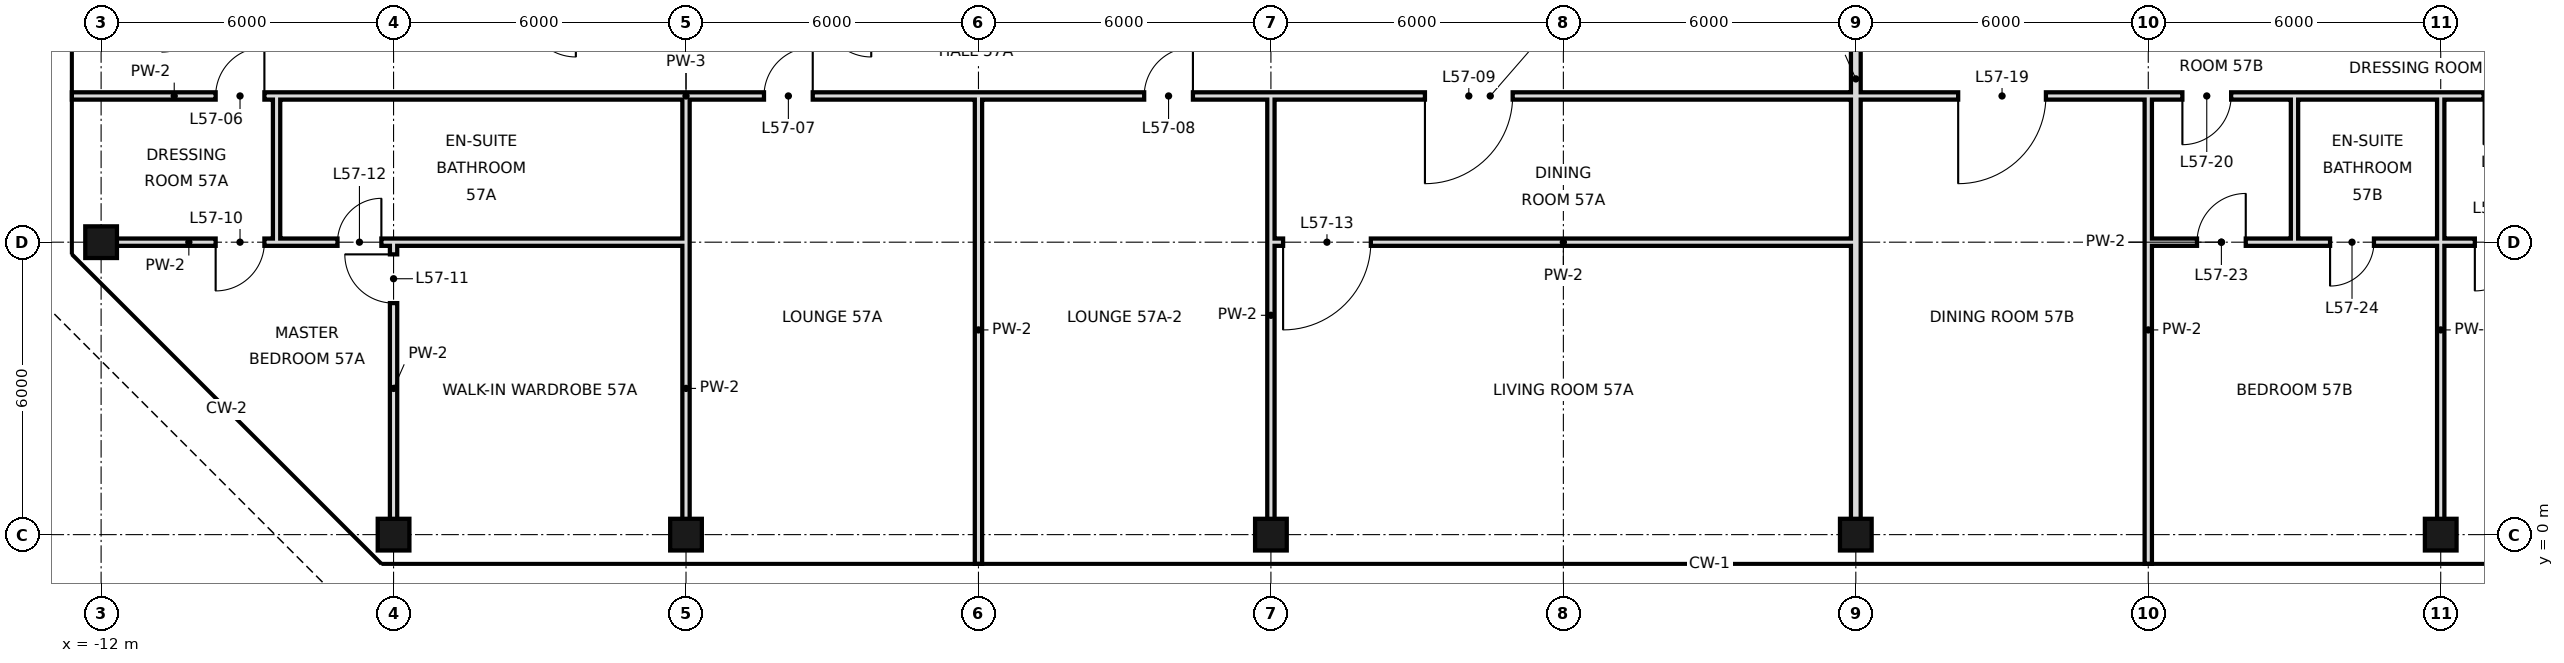
"""IFC4 building model, lengths in metres.
Left out: names, types, materials, properties, quantities, classifications, styles, units other than length and angle.
Written with IfcOpenShell. Run it as: python <this file> out.ifc"""

import sys

from ifc_helpers import new_model, si_unit, direction, frame, frame_2d, origin, origin_2d, place, context, subcontext, project, spatial, rectangle, hollow_rectangle, extrude, element, fill, save


model = new_model("IFC4")
c1 = context("Model", 3, precision=1e-05, world=origin(), true_north=direction((0.0, 1.0)))
c2 = subcontext(c1, "Body", "Model", "MODEL_VIEW")
j1 = project(units=[si_unit("LENGTHUNIT", "METRE"), si_unit("PLANEANGLEUNIT", "RADIAN")], contexts=[c1])
p1 = place(None, origin())
s1 = spatial("IfcSite", under=j1, at=p1, CompositionType="ELEMENT")
p2 = place(p1, origin())
s2 = spatial("IfcBuilding", under=s1, at=p2, CompositionType="ELEMENT")
p3 = place(p2, frame((0.0, 0.0, 243.2)))
s3 = spatial("IfcBuildingStorey", under=s2, at=p3, CompositionType="ELEMENT", Elevation=243.2)
for number, where, z_axis, x_axis in (
    (1, (-12.0, 6.0, 0.0), (0.0, 0.0, 1.0), (1.0, 0.0, 0.0)),
    (2, (-6.0, 0.0, 0.0), (0.0, 0.0, 1.0), (1.0, 0.0, 0.0)),
    (3, (0.0, 0.0, 0.0), (0.0, 0.0, 1.0), (1.0, 0.0, 0.0)),
    (4, (12.0, 0.0, 0.0), (0.0, 0.0, 1.0), (1.0, 0.0, 0.0)),
    (5, (24.0, 0.0, 0.0), (0.0, 0.0, 1.0), (1.0, 0.0, 0.0)),
    (6, (36.0, 0.0, 0.0), (0.0, 0.0, 1.0), (1.0, 0.0, 0.0)),
):
    element("IfcColumn", number, at=place(p3, frame(where, z_axis=z_axis, x_axis=x_axis)), inside=s3, PredefinedType="COLUMN", context=c2, shape_type="SweptSolid", body=[
        extrude(hollow_rectangle(XDim=0.65, YDim=0.65, WallThickness=0.032, at=origin_2d()), origin(), (0.0, 0.0, 1.0), 3.6),
    ])
p4 = place(p3, frame((-6.0, 0.0, 0.0), z_axis=(0.0, 0.0, 1.0), x_axis=(0.0, 1.0, 0.0)))
e7 = element("IfcWall", 7, at=p4, inside=s3, PredefinedType="PARTITIONING", context=c2, shape_type="SweptSolid", body=[
    extrude(rectangle(XDim=6.0, YDim=0.15, at=frame_2d((3.0, 0.0))), origin(), (0.0, 0.0, 1.0), 3.42),
])
p5 = place(p4, frame((4.75, 0.0, 0.0)))
e8 = element("IfcOpeningElement", 8, at=p5, cuts=e7, PredefinedType="OPENING", context=c2, shape_type="SweptSolid", body=[
    extrude(rectangle(XDim=1.0, YDim=2.4, at=frame_2d((0.5, 1.2))), frame((0.0, 0.085, 0.0), z_axis=(0.0, -1.0, 0.0), x_axis=(1.0, 0.0, 0.0)), (0.0, 0.0, 1.0), 0.17),
])
p6 = place(p3, frame((-8.4, 6.0, 0.0), z_axis=(0.0, 0.0, 1.0), x_axis=(0.0, 1.0, 0.0)))
e9 = element("IfcWall", 9, at=p6, inside=s3, PredefinedType="PARTITIONING", context=c2, shape_type="SweptSolid", body=[
    extrude(rectangle(XDim=3.0, YDim=0.15, at=frame_2d((1.5, 0.0))), origin(), (0.0, 0.0, 1.0), 3.42),
])
p7 = place(p3, frame((0.0, 0.0, 0.0), z_axis=(0.0, 0.0, 1.0), x_axis=(0.0, 1.0, 0.0)))
e10 = element("IfcWall", 10, at=p7, inside=s3, PredefinedType="PARTITIONING", context=c2, shape_type="SweptSolid", body=[
    extrude(rectangle(XDim=6.0, YDim=0.15, at=frame_2d((3.0, 0.0))), origin(), (0.0, 0.0, 1.0), 2.72),
])
p8 = place(p3, frame((0.0, 6.0, 0.0), z_axis=(0.0, 0.0, 1.0), x_axis=(0.0, 1.0, 0.0)))
e11 = element("IfcWall", 11, at=p8, inside=s3, PredefinedType="PARTITIONING", context=c2, shape_type="SweptSolid", body=[
    extrude(rectangle(XDim=3.0, YDim=0.15, at=frame_2d((1.5, 0.0))), origin(), (0.0, 0.0, 1.0), 2.72),
])
p9 = place(p3, frame((12.0, 0.0, 0.0), z_axis=(0.0, 0.0, 1.0), x_axis=(0.0, 1.0, 0.0)))
e12 = element("IfcWall", 12, at=p9, inside=s3, PredefinedType="PARTITIONING", context=c2, shape_type="SweptSolid", body=[
    extrude(rectangle(XDim=9.0, YDim=0.15, at=frame_2d((4.5, 0.0))), origin(), (0.0, 0.0, 1.0), 2.72),
])
p10 = place(p3, frame((24.0, 0.0, 0.0), z_axis=(0.0, 0.0, 1.0), x_axis=(0.0, 1.0, 0.0)))
e13 = element("IfcWall", 13, at=p10, inside=s3, PredefinedType="SOLIDWALL", context=c2, shape_type="SweptSolid", body=[
    extrude(rectangle(XDim=18.7, YDim=0.2, at=frame_2d((9.35, 0.0))), origin(), (0.0, 0.0, 1.0), 2.72),
])
p11 = place(p3, frame((30.0, -0.6, 0.0), z_axis=(0.0, 0.0, 1.0), x_axis=(0.0, 1.0, 0.0)))
e14 = element("IfcWall", 14, at=p11, inside=s3, PredefinedType="PARTITIONING", context=c2, shape_type="SweptSolid", body=[
    extrude(rectangle(XDim=9.6, YDim=0.15, at=frame_2d((4.8, 0.0))), origin(), (0.0, 0.0, 1.0), 2.72),
])
p12 = place(p3, frame((33.0, 6.0, 0.0), z_axis=(0.0, 0.0, 1.0), x_axis=(0.0, 1.0, 0.0)))
e15 = element("IfcWall", 15, at=p12, inside=s3, PredefinedType="PARTITIONING", context=c2, shape_type="SweptSolid", body=[
    extrude(rectangle(XDim=3.0, YDim=0.15, at=frame_2d((1.5, 0.0))), origin(), (0.0, 0.0, 1.0), 3.42),
])
p13 = place(p3, frame((36.0, 0.0, 0.0), z_axis=(0.0, 0.0, 1.0), x_axis=(0.0, 1.0, 0.0)))
e16 = element("IfcWall", 16, at=p13, inside=s3, PredefinedType="PARTITIONING", context=c2, shape_type="SweptSolid", body=[
    extrude(rectangle(XDim=6.0, YDim=0.15, at=frame_2d((3.0, 0.0))), origin(), (0.0, 0.0, 1.0), 2.72),
])
p14 = place(p3, frame((36.0, 6.0, 0.0), z_axis=(0.0, 0.0, 1.0), x_axis=(0.0, 1.0, 0.0)))
e17 = element("IfcWall", 17, at=p14, inside=s3, PredefinedType="PARTITIONING", context=c2, shape_type="SweptSolid", body=[
    extrude(rectangle(XDim=3.0, YDim=0.15, at=frame_2d((1.5, 0.0))), origin(), (0.0, 0.0, 1.0), 2.72),
])
p15 = place(p3, frame((6.0, -0.6, 0.0), z_axis=(0.0, 0.0, 1.0), x_axis=(0.0, 1.0, 0.0)))
e18 = element("IfcWall", 18, at=p15, inside=s3, PredefinedType="PARTITIONING", context=c2, shape_type="SweptSolid", body=[
    extrude(rectangle(XDim=9.6, YDim=0.15, at=frame_2d((4.8, 0.0))), origin(), (0.0, 0.0, 1.0), 2.72),
])
p16 = place(p3, frame((-12.0, 6.0, 0.0), z_axis=(0.0, 0.0, 1.0), x_axis=(1.0, 0.0, 0.0)))
e19 = element("IfcWall", 19, at=p16, inside=s3, PredefinedType="PARTITIONING", context=c2, shape_type="SweptSolid", body=[
    extrude(rectangle(XDim=3.6, YDim=0.15, at=frame_2d((1.8, 0.0))), origin(), (0.0, 0.0, 1.0), 2.72),
])
p17 = place(p16, frame((2.35, 0.0, 0.0)))
e20 = element("IfcOpeningElement", 20, at=p17, cuts=e19, PredefinedType="OPENING", context=c2, shape_type="SweptSolid", body=[
    extrude(rectangle(XDim=1.0, YDim=2.4, at=frame_2d((0.5, 1.2))), frame((0.0, 0.085, 0.0), z_axis=(0.0, -1.0, 0.0), x_axis=(1.0, 0.0, 0.0)), (0.0, 0.0, 1.0), 0.17),
])
p18 = place(p3, frame((12.0, 6.0, 0.0), z_axis=(0.0, 0.0, 1.0), x_axis=(1.0, 0.0, 0.0)))
e21 = element("IfcWall", 21, at=p18, inside=s3, PredefinedType="PARTITIONING", context=c2, shape_type="SweptSolid", body=[
    extrude(rectangle(XDim=12.0, YDim=0.15, at=frame_2d((6.0, 0.0))), origin(), (0.0, 0.0, 1.0), 2.97),
])
p19 = place(p18, frame((0.25, 0.0, 0.0)))
e22 = element("IfcOpeningElement", 22, at=p19, cuts=e21, PredefinedType="OPENING", context=c2, shape_type="SweptSolid", body=[
    extrude(rectangle(XDim=1.8, YDim=2.4, at=frame_2d((0.9, 1.2))), frame((0.0, 0.085, 0.0), z_axis=(0.0, -1.0, 0.0), x_axis=(1.0, 0.0, 0.0)), (0.0, 0.0, 1.0), 0.17),
])
p20 = place(p3, frame((30.0, 6.0, 0.0), z_axis=(0.0, 0.0, 1.0), x_axis=(1.0, 0.0, 0.0)))
e23 = element("IfcWall", 23, at=p20, inside=s3, PredefinedType="PARTITIONING", context=c2, shape_type="SweptSolid", body=[
    extrude(rectangle(XDim=3.0, YDim=0.15, at=frame_2d((1.5, 0.0))), origin(), (0.0, 0.0, 1.0), 2.97),
])
p21 = place(p20, frame((1.0, 0.0, 0.0)))
e24 = element("IfcOpeningElement", 24, at=p21, cuts=e23, PredefinedType="OPENING", context=c2, shape_type="SweptSolid", body=[
    extrude(rectangle(XDim=1.0, YDim=2.4, at=frame_2d((0.5, 1.2))), frame((0.0, 0.085, 0.0), z_axis=(0.0, -1.0, 0.0), x_axis=(1.0, 0.0, 0.0)), (0.0, 0.0, 1.0), 0.17),
])
p22 = place(p3, frame((36.0, 6.0, 0.0), z_axis=(0.0, 0.0, 1.0), x_axis=(1.0, 0.0, 0.0)))
e25 = element("IfcWall", 25, at=p22, inside=s3, PredefinedType="PARTITIONING", context=c2, shape_type="SweptSolid", body=[
    extrude(rectangle(XDim=2.4, YDim=0.15, at=frame_2d((1.2, 0.0))), origin(), (0.0, 0.0, 1.0), 2.97),
])
p23 = place(p22, frame((0.7, 0.0, 0.0)))
e26 = element("IfcOpeningElement", 26, at=p23, cuts=e25, PredefinedType="OPENING", context=c2, shape_type="SweptSolid", body=[
    extrude(rectangle(XDim=1.0, YDim=2.4, at=frame_2d((0.5, 1.2))), frame((0.0, 0.085, 0.0), z_axis=(0.0, -1.0, 0.0), x_axis=(1.0, 0.0, 0.0)), (0.0, 0.0, 1.0), 0.17),
])
p24 = place(p3, frame((-8.4, 6.0, 0.0), z_axis=(0.0, 0.0, 1.0), x_axis=(1.0, 0.0, 0.0)))
e27 = element("IfcWall", 27, at=p24, inside=s3, PredefinedType="PARTITIONING", context=c2, shape_type="SweptSolid", body=[
    extrude(rectangle(XDim=8.4, YDim=0.15, at=frame_2d((4.2, 0.0))), origin(), (0.0, 0.0, 1.0), 2.72),
])
p25 = place(p24, frame((1.25, 0.0, 0.0)))
e28 = element("IfcOpeningElement", 28, at=p25, cuts=e27, PredefinedType="OPENING", context=c2, shape_type="SweptSolid", body=[
    extrude(rectangle(XDim=0.9, YDim=2.4, at=frame_2d((0.45, 1.2))), frame((0.0, 0.085, 0.0), z_axis=(0.0, -1.0, 0.0), x_axis=(1.0, 0.0, 0.0)), (0.0, 0.0, 1.0), 0.17),
])
p26 = place(p3, frame((33.0, 6.0, 0.0), z_axis=(0.0, 0.0, 1.0), x_axis=(1.0, 0.0, 0.0)))
e29 = element("IfcWall", 29, at=p26, inside=s3, PredefinedType="PARTITIONING", context=c2, shape_type="SweptSolid", body=[
    extrude(rectangle(XDim=3.0, YDim=0.15, at=frame_2d((1.5, 0.0))), origin(), (0.0, 0.0, 1.0), 2.97),
])
p27 = place(p26, frame((0.73, 0.0, 0.0)))
e30 = element("IfcOpeningElement", 30, at=p27, cuts=e29, PredefinedType="OPENING", context=c2, shape_type="SweptSolid", body=[
    extrude(rectangle(XDim=0.9, YDim=2.4, at=frame_2d((0.45, 1.2))), frame((0.0, 0.085, 0.0), z_axis=(0.0, -1.0, 0.0), x_axis=(1.0, 0.0, 0.0)), (0.0, 0.0, 1.0), 0.17),
])
p28 = place(p3, frame((-12.6, 9.0, 0.0), z_axis=(0.0, 0.0, 1.0), x_axis=(1.0, 0.0, 0.0)))
e31 = element("IfcWall", 31, at=p28, inside=s3, PredefinedType="PARTITIONING", context=c2, shape_type="SweptSolid", body=[
    extrude(rectangle(XDim=4.2, YDim=0.15, at=frame_2d((2.1, 0.0))), origin(), (0.0, 0.0, 1.0), 3.42),
])
p29 = place(p28, frame((2.95, 0.0, 0.0)))
e32 = element("IfcOpeningElement", 32, at=p29, cuts=e31, PredefinedType="OPENING", context=c2, shape_type="SweptSolid", body=[
    extrude(rectangle(XDim=1.0, YDim=2.4, at=frame_2d((0.5, 1.2))), frame((0.0, 0.085, 0.0), z_axis=(0.0, -1.0, 0.0), x_axis=(1.0, 0.0, 0.0)), (0.0, 0.0, 1.0), 0.17),
])
p30 = place(p3, frame((0.0, 9.0, 0.0), z_axis=(0.0, 0.0, 1.0), x_axis=(1.0, 0.0, 0.0)))
e33 = element("IfcWall", 33, at=p30, inside=s3, PredefinedType="PARTITIONING", context=c2, shape_type="SweptSolid", body=[
    extrude(rectangle(XDim=33.0, YDim=0.15, at=frame_2d((16.5, 0.0))), origin(), (0.0, 0.0, 1.0), 3.42),
])
p31 = place(p30, frame((1.6, 0.0, 0.0)))
e34 = element("IfcOpeningElement", 34, at=p31, cuts=e33, PredefinedType="OPENING", context=c2, shape_type="SweptSolid", body=[
    extrude(rectangle(XDim=1.0, YDim=2.4, at=frame_2d((0.5, 1.2))), frame((0.0, 0.085, 0.0), z_axis=(0.0, -1.0, 0.0), x_axis=(1.0, 0.0, 0.0)), (0.0, 0.0, 1.0), 0.17),
])
p32 = place(p30, frame((9.4, 0.0, 0.0)))
e35 = element("IfcOpeningElement", 35, at=p32, cuts=e33, PredefinedType="OPENING", context=c2, shape_type="SweptSolid", body=[
    extrude(rectangle(XDim=1.0, YDim=2.4, at=frame_2d((0.5, 1.2))), frame((0.0, 0.085, 0.0), z_axis=(0.0, -1.0, 0.0), x_axis=(1.0, 0.0, 0.0)), (0.0, 0.0, 1.0), 0.17),
])
p33 = place(p30, frame((15.16, 0.0, 0.0)))
e36 = element("IfcOpeningElement", 36, at=p33, cuts=e33, PredefinedType="OPENING", context=c2, shape_type="SweptSolid", body=[
    extrude(rectangle(XDim=1.8, YDim=2.4, at=frame_2d((0.9, 1.2))), frame((0.0, 0.085, 0.0), z_axis=(0.0, -1.0, 0.0), x_axis=(1.0, 0.0, 0.0)), (0.0, 0.0, 1.0), 0.17),
])
p34 = place(p30, frame((26.1, 0.0, 0.0)))
e37 = element("IfcOpeningElement", 37, at=p34, cuts=e33, PredefinedType="OPENING", context=c2, shape_type="SweptSolid", body=[
    extrude(rectangle(XDim=1.8, YDim=2.4, at=frame_2d((0.9, 1.2))), frame((0.0, 0.085, 0.0), z_axis=(0.0, -1.0, 0.0), x_axis=(1.0, 0.0, 0.0)), (0.0, 0.0, 1.0), 0.17),
])
p35 = place(p30, frame((30.7, 0.0, 0.0)))
e38 = element("IfcOpeningElement", 38, at=p35, cuts=e33, PredefinedType="OPENING", context=c2, shape_type="SweptSolid", body=[
    extrude(rectangle(XDim=1.0, YDim=2.4, at=frame_2d((0.5, 1.2))), frame((0.0, 0.085, 0.0), z_axis=(0.0, -1.0, 0.0), x_axis=(1.0, 0.0, 0.0)), (0.0, 0.0, 1.0), 0.17),
])
p36 = place(p3, frame((36.0, 9.0, 0.0), z_axis=(0.0, 0.0, 1.0), x_axis=(1.0, 0.0, 0.0)))
e39 = element("IfcWall", 39, at=p36, inside=s3, PredefinedType="PARTITIONING", context=c2, shape_type="SweptSolid", body=[
    extrude(rectangle(XDim=2.4, YDim=0.15, at=frame_2d((1.2, 0.0))), origin(), (0.0, 0.0, 1.0), 3.42),
])
p37 = place(p36, frame((0.88, 0.0, 0.0)))
e40 = element("IfcOpeningElement", 40, at=p37, cuts=e39, PredefinedType="OPENING", context=c2, shape_type="SweptSolid", body=[
    extrude(rectangle(XDim=1.0, YDim=2.4, at=frame_2d((0.5, 1.2))), frame((0.0, 0.085, 0.0), z_axis=(0.0, -1.0, 0.0), x_axis=(1.0, 0.0, 0.0)), (0.0, 0.0, 1.0), 0.17),
])
p38 = place(p3, frame((-8.4, 9.0, 0.0), z_axis=(0.0, 0.0, 1.0), x_axis=(1.0, 0.0, 0.0)))
e41 = element("IfcWall", 41, at=p38, inside=s3, PredefinedType="PARTITIONING", context=c2, shape_type="SweptSolid", body=[
    extrude(rectangle(XDim=8.4, YDim=0.15, at=frame_2d((4.2, 0.0))), origin(), (0.0, 0.0, 1.0), 3.42),
])
p39 = place(p3, frame((33.0, 9.0, 0.0), z_axis=(0.0, 0.0, 1.0), x_axis=(1.0, 0.0, 0.0)))
e42 = element("IfcWall", 42, at=p39, inside=s3, PredefinedType="PARTITIONING", context=c2, shape_type="SweptSolid", body=[
    extrude(rectangle(XDim=3.0, YDim=0.15, at=frame_2d((1.5, 0.0))), origin(), (0.0, 0.0, 1.0), 3.42),
])
p40 = place(p29, frame((1.0, 0.0, 0.0), z_axis=(0.0, 0.0, 1.0), x_axis=(-1.0, 0.0, 0.0)))
e43 = element("IfcDoor", 43, at=p40, inside=s3, OperationType="SINGLE_SWING_LEFT", PredefinedType="DOOR", context=c2, shape_type="SweptSolid", body=[
    extrude(rectangle(XDim=1.0, YDim=2.4, at=frame_2d((0.5, 1.2))), frame((0.0, 0.025, 0.0), z_axis=(0.0, -1.0, 0.0), x_axis=(1.0, 0.0, 0.0)), (0.0, 0.0, 1.0), 0.05),
])
fill(e32, e43)
p41 = place(p31, frame((1.0, 0.0, 0.0), z_axis=(0.0, 0.0, 1.0), x_axis=(-1.0, 0.0, 0.0)))
e44 = element("IfcDoor", 44, at=p41, inside=s3, OperationType="SINGLE_SWING_LEFT", PredefinedType="DOOR", context=c2, shape_type="SweptSolid", body=[
    extrude(rectangle(XDim=1.0, YDim=2.4, at=frame_2d((0.5, 1.2))), frame((0.0, 0.025, 0.0), z_axis=(0.0, -1.0, 0.0), x_axis=(1.0, 0.0, 0.0)), (0.0, 0.0, 1.0), 0.05),
])
fill(e34, e44)
p42 = place(p32, frame((1.0, 0.0, 0.0), z_axis=(0.0, 0.0, 1.0), x_axis=(-1.0, 0.0, 0.0)))
e45 = element("IfcDoor", 45, at=p42, inside=s3, OperationType="SINGLE_SWING_LEFT", PredefinedType="DOOR", context=c2, shape_type="SweptSolid", body=[
    extrude(rectangle(XDim=1.0, YDim=2.4, at=frame_2d((0.5, 1.2))), frame((0.0, 0.025, 0.0), z_axis=(0.0, -1.0, 0.0), x_axis=(1.0, 0.0, 0.0)), (0.0, 0.0, 1.0), 0.05),
])
fill(e35, e45)
p43 = place(p33, frame((1.8, 0.0, 0.0), z_axis=(0.0, 0.0, 1.0), x_axis=(-1.0, 0.0, 0.0)))
e46 = element("IfcDoor", 46, at=p43, inside=s3, OperationType="SINGLE_SWING_RIGHT", PredefinedType="DOOR", context=c2, shape_type="SweptSolid", body=[
    extrude(rectangle(XDim=1.8, YDim=2.4, at=frame_2d((0.9, 1.2))), frame((0.0, 0.025, 0.0), z_axis=(0.0, -1.0, 0.0), x_axis=(1.0, 0.0, 0.0)), (0.0, 0.0, 1.0), 0.05),
])
fill(e36, e46)
p44 = place(p17, frame((1.0, 0.0, 0.0), z_axis=(0.0, 0.0, 1.0), x_axis=(-1.0, 0.0, 0.0)))
e47 = element("IfcDoor", 47, at=p44, inside=s3, OperationType="SINGLE_SWING_RIGHT", PredefinedType="DOOR", context=c2, shape_type="SweptSolid", body=[
    extrude(rectangle(XDim=1.0, YDim=2.4, at=frame_2d((0.5, 1.2))), frame((0.0, 0.025, 0.0), z_axis=(0.0, -1.0, 0.0), x_axis=(1.0, 0.0, 0.0)), (0.0, 0.0, 1.0), 0.05),
])
fill(e20, e47)
p45 = place(p5, frame((1.0, 0.0, 0.0), z_axis=(0.0, 0.0, 1.0), x_axis=(-1.0, 0.0, 0.0)))
e48 = element("IfcDoor", 48, at=p45, inside=s3, OperationType="SINGLE_SWING_LEFT", PredefinedType="DOOR", context=c2, shape_type="SweptSolid", body=[
    extrude(rectangle(XDim=1.0, YDim=2.4, at=frame_2d((0.5, 1.2))), frame((0.0, 0.025, 0.0), z_axis=(0.0, -1.0, 0.0), x_axis=(1.0, 0.0, 0.0)), (0.0, 0.0, 1.0), 0.05),
])
fill(e8, e48)
p46 = place(p25, frame((0.9, 0.0, 0.0), z_axis=(0.0, 0.0, 1.0), x_axis=(-1.0, 0.0, 0.0)))
e49 = element("IfcDoor", 49, at=p46, inside=s3, OperationType="SINGLE_SWING_LEFT", PredefinedType="DOOR", context=c2, shape_type="SweptSolid", body=[
    extrude(rectangle(XDim=0.9, YDim=2.4, at=frame_2d((0.45, 1.2))), frame((0.0, 0.025, 0.0), z_axis=(0.0, -1.0, 0.0), x_axis=(1.0, 0.0, 0.0)), (0.0, 0.0, 1.0), 0.05),
])
fill(e28, e49)
p47 = place(p19, frame((1.8, 0.0, 0.0), z_axis=(0.0, 0.0, 1.0), x_axis=(-1.0, 0.0, 0.0)))
e50 = element("IfcDoor", 50, at=p47, inside=s3, OperationType="SINGLE_SWING_RIGHT", PredefinedType="DOOR", context=c2, shape_type="SweptSolid", body=[
    extrude(rectangle(XDim=1.8, YDim=2.4, at=frame_2d((0.9, 1.2))), frame((0.0, 0.025, 0.0), z_axis=(0.0, -1.0, 0.0), x_axis=(1.0, 0.0, 0.0)), (0.0, 0.0, 1.0), 0.05),
])
fill(e22, e50)
p48 = place(p34, frame((1.8, 0.0, 0.0), z_axis=(0.0, 0.0, 1.0), x_axis=(-1.0, 0.0, 0.0)))
e51 = element("IfcDoor", 51, at=p48, inside=s3, OperationType="SINGLE_SWING_RIGHT", PredefinedType="DOOR", context=c2, shape_type="SweptSolid", body=[
    extrude(rectangle(XDim=1.8, YDim=2.4, at=frame_2d((0.9, 1.2))), frame((0.0, 0.025, 0.0), z_axis=(0.0, -1.0, 0.0), x_axis=(1.0, 0.0, 0.0)), (0.0, 0.0, 1.0), 0.05),
])
fill(e37, e51)
p49 = place(p35, frame((1.0, 0.0, 0.0), z_axis=(0.0, 0.0, 1.0), x_axis=(-1.0, 0.0, 0.0)))
e52 = element("IfcDoor", 52, at=p49, inside=s3, OperationType="SINGLE_SWING_RIGHT", PredefinedType="DOOR", context=c2, shape_type="SweptSolid", body=[
    extrude(rectangle(XDim=1.0, YDim=2.4, at=frame_2d((0.5, 1.2))), frame((0.0, 0.025, 0.0), z_axis=(0.0, -1.0, 0.0), x_axis=(1.0, 0.0, 0.0)), (0.0, 0.0, 1.0), 0.05),
])
fill(e38, e52)
p50 = place(p37, frame((1.0, 0.0, 0.0), z_axis=(0.0, 0.0, 1.0), x_axis=(-1.0, 0.0, 0.0)))
e53 = element("IfcDoor", 53, at=p50, inside=s3, OperationType="SINGLE_SWING_RIGHT", PredefinedType="DOOR", context=c2, shape_type="SweptSolid", body=[
    extrude(rectangle(XDim=1.0, YDim=2.4, at=frame_2d((0.5, 1.2))), frame((0.0, 0.025, 0.0), z_axis=(0.0, -1.0, 0.0), x_axis=(1.0, 0.0, 0.0)), (0.0, 0.0, 1.0), 0.05),
])
fill(e40, e53)
p51 = place(p21, frame((1.0, 0.0, 0.0), z_axis=(0.0, 0.0, 1.0), x_axis=(-1.0, 0.0, 0.0)))
e54 = element("IfcDoor", 54, at=p51, inside=s3, OperationType="SINGLE_SWING_LEFT", PredefinedType="DOOR", context=c2, shape_type="SweptSolid", body=[
    extrude(rectangle(XDim=1.0, YDim=2.4, at=frame_2d((0.5, 1.2))), frame((0.0, 0.025, 0.0), z_axis=(0.0, -1.0, 0.0), x_axis=(1.0, 0.0, 0.0)), (0.0, 0.0, 1.0), 0.05),
])
fill(e24, e54)
p52 = place(p27, frame((0.9, 0.0, 0.0), z_axis=(0.0, 0.0, 1.0), x_axis=(-1.0, 0.0, 0.0)))
e55 = element("IfcDoor", 55, at=p52, inside=s3, OperationType="SINGLE_SWING_RIGHT", PredefinedType="DOOR", context=c2, shape_type="SweptSolid", body=[
    extrude(rectangle(XDim=0.9, YDim=2.4, at=frame_2d((0.45, 1.2))), frame((0.0, 0.025, 0.0), z_axis=(0.0, -1.0, 0.0), x_axis=(1.0, 0.0, 0.0)), (0.0, 0.0, 1.0), 0.05),
])
fill(e30, e55)
p53 = place(p23, frame((1.0, 0.0, 0.0), z_axis=(0.0, 0.0, 1.0), x_axis=(-1.0, 0.0, 0.0)))
e56 = element("IfcDoor", 56, at=p53, inside=s3, OperationType="SINGLE_SWING_RIGHT", PredefinedType="DOOR", context=c2, shape_type="SweptSolid", body=[
    extrude(rectangle(XDim=1.0, YDim=2.4, at=frame_2d((0.5, 1.2))), frame((0.0, 0.025, 0.0), z_axis=(0.0, -1.0, 0.0), x_axis=(1.0, 0.0, 0.0)), (0.0, 0.0, 1.0), 0.05),
])
fill(e26, e56)
save(model, sys.argv[1])
